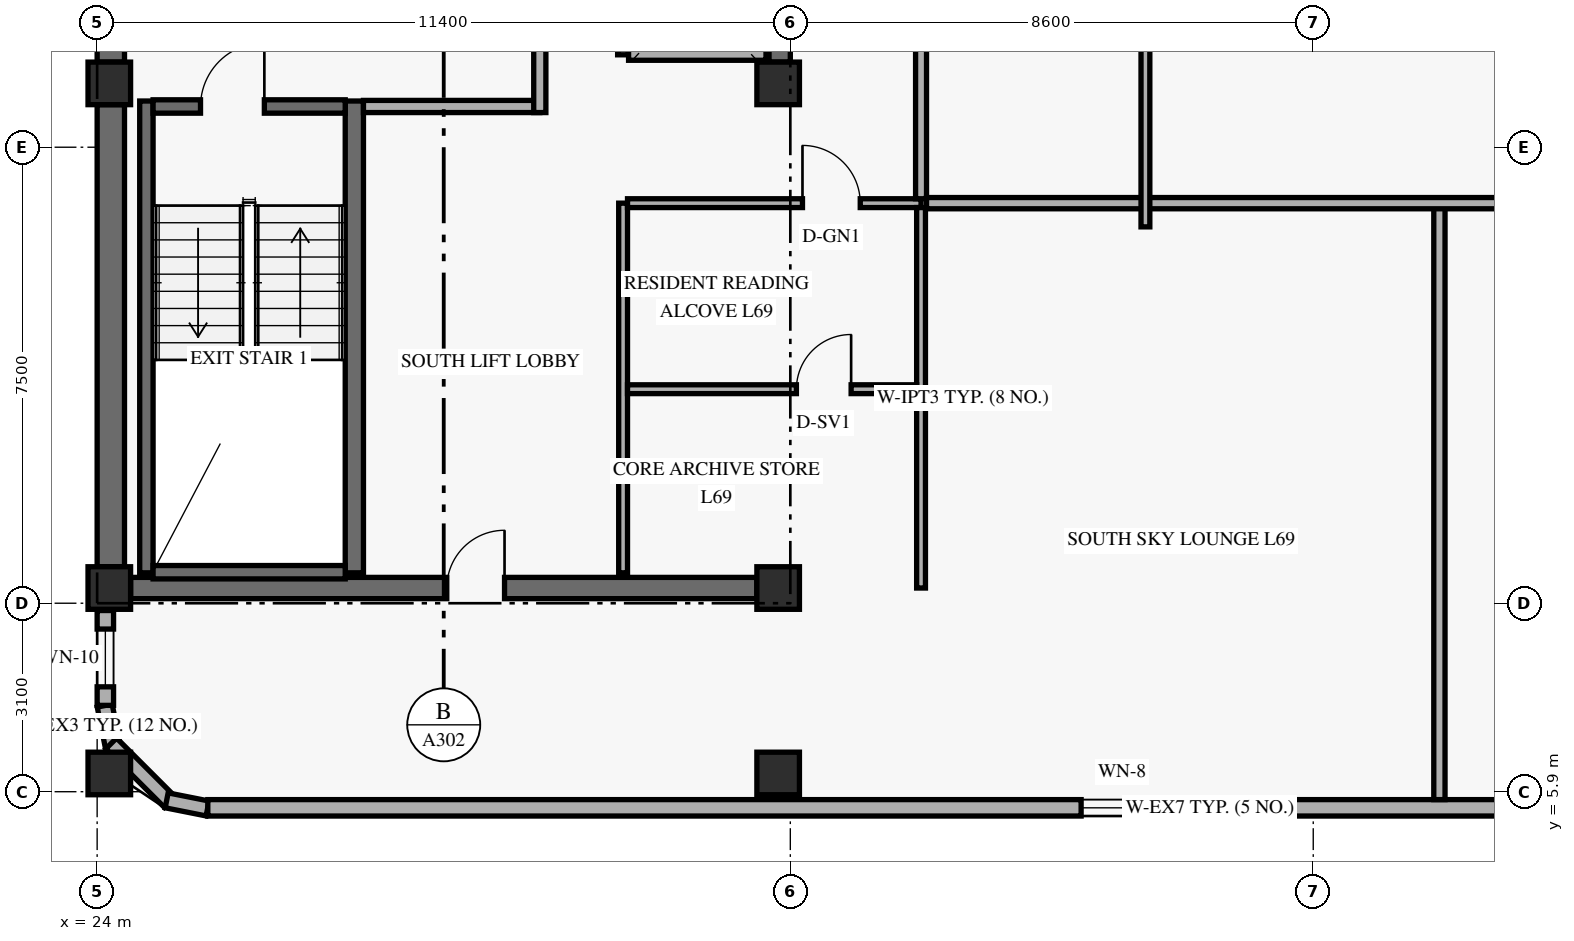
"""IFC4 building model, lengths in metres.
Left out: names, types, materials, properties, quantities, classifications, styles, units other than length and angle.
Written with IfcOpenShell. Run it as: python <this file> out.ifc"""

import sys

from ifc_helpers import new_model, si_unit, direction, frame, frame_2d, origin, origin_2d, place, context, subcontext, project, spatial, rectangle, extrude, element, fill, save


model = new_model("IFC4")
c1 = context("Model", 3, precision=1e-05, world=origin(), true_north=direction((0.0, 1.0)))
c2 = subcontext(c1, "Body", "Model", "MODEL_VIEW")
j1 = project(units=[si_unit("LENGTHUNIT", "METRE"), si_unit("PLANEANGLEUNIT", "RADIAN")], contexts=[c1])
p1 = place(None, origin())
s1 = spatial("IfcSite", under=j1, at=p1, CompositionType="ELEMENT")
p2 = place(p1, origin())
s2 = spatial("IfcBuilding", under=s1, at=p2, CompositionType="ELEMENT")
p3 = place(p2, frame((0.0, 0.0, 264.0)))
s3 = spatial("IfcBuildingStorey", under=s2, at=p3, CompositionType="ELEMENT", Elevation=264.0)
p4 = place(p3, frame((24.225, 9.6, 0.0), z_axis=(0.0, 0.0, 1.0), x_axis=(0.0, 1.0, 0.0)))
e1 = element("IfcWall", 1, at=p4, inside=s3, PredefinedType="SHEAR", context=c2, shape_type="SweptSolid", body=[
    extrude(rectangle(XDim=7.6, YDim=0.45, at=frame_2d((3.8, 0.0))), origin(), (0.0, 0.0, 1.0), 2.821),
])
p5 = place(p3, frame((24.225, 17.9, 0.0), z_axis=(0.0, 0.0, 1.0), x_axis=(0.0, 1.0, 0.0)))
e2 = element("IfcWall", 2, at=p5, inside=s3, PredefinedType="SHEAR", context=c2, shape_type="SweptSolid", body=[
    extrude(rectangle(XDim=11.95, YDim=0.45, at=frame_2d((5.975, 0.0))), origin(), (0.0, 0.0, 1.0), 2.821),
])
p6 = place(p3, frame((35.225, 17.9, 0.0), z_axis=(0.0, 0.0, 1.0), x_axis=(0.0, 1.0, 0.0)))
e3 = element("IfcWall", 3, at=p6, inside=s3, PredefinedType="SHEAR", context=c2, shape_type="SweptSolid", body=[
    extrude(rectangle(XDim=10.2, YDim=0.35, at=frame_2d((5.1, 0.0))), origin(), (0.0, 0.0, 1.0), 2.821),
])
p7 = place(p3, frame((24.55, 9.25, 0.0), z_axis=(0.0, 0.0, 1.0), x_axis=(1.0, 0.0, 0.0)))
e4 = element("IfcWall", 4, at=p7, inside=s3, PredefinedType="SHEAR", context=c2, shape_type="SweptSolid", body=[
    extrude(rectangle(XDim=10.3, YDim=0.35, at=frame_2d((5.15, 0.0))), origin(), (0.0, 0.0, 1.0), 3.36),
])
p8 = place(p7, frame((5.2, 0.0, 0.0)))
e5 = element("IfcOpeningElement", 5, at=p8, cuts=e4, PredefinedType="OPENING", context=c2, shape_type="SweptSolid", body=[
    extrude(rectangle(XDim=0.95, YDim=2.15, at=frame_2d((0.475, 1.075))), frame((0.0, 0.185, 0.0), z_axis=(0.0, -1.0, 0.0), x_axis=(1.0, 0.0, 0.0)), (0.0, 0.0, 1.0), 0.37),
])
p9 = place(p3, frame((24.81, 9.5, 0.0), z_axis=(0.0, 0.0, 1.0), x_axis=(0.0, 1.0, 0.0)))
e6 = element("IfcWall", 6, at=p9, inside=s3, PredefinedType="SHEAR", context=c2, shape_type="SweptSolid", body=[
    extrude(rectangle(XDim=7.76, YDim=0.22, at=frame_2d((3.88, 0.0))), origin(), (0.0, 0.0, 1.0), 3.36),
])
p10 = place(p3, frame((28.23, 9.5, 0.0), z_axis=(0.0, 0.0, 1.0), x_axis=(0.0, 1.0, 0.0)))
e7 = element("IfcWall", 7, at=p10, inside=s3, PredefinedType="SHEAR", context=c2, shape_type="SweptSolid", body=[
    extrude(rectangle(XDim=7.76, YDim=0.3, at=frame_2d((3.88, 0.0))), origin(), (0.0, 0.0, 1.0), 3.36),
])
p11 = place(p3, frame((24.92, 9.51, 0.0), z_axis=(0.0, 0.0, 1.0), x_axis=(1.0, 0.0, 0.0)))
e8 = element("IfcWall", 8, at=p11, inside=s3, PredefinedType="SHEAR", context=c2, shape_type="SweptSolid", body=[
    extrude(rectangle(XDim=3.16, YDim=0.22, at=frame_2d((1.58, 0.0))), origin(), (0.0, 0.0, 1.0), 3.36),
])
p12 = place(p3, frame((24.92, 17.17, 0.0), z_axis=(0.0, 0.0, 1.0), x_axis=(1.0, 0.0, 0.0)))
e9 = element("IfcWall", 9, at=p12, inside=s3, PredefinedType="SHEAR", context=c2, shape_type="SweptSolid", body=[
    extrude(rectangle(XDim=3.16, YDim=0.22, at=frame_2d((1.58, 0.0))), origin(), (0.0, 0.0, 1.0), 3.36),
])
p13 = place(p12, frame((0.78, 0.0, 0.0)))
e10 = element("IfcOpeningElement", 10, at=p13, cuts=e9, PredefinedType="OPENING", context=c2, shape_type="SweptSolid", body=[
    extrude(rectangle(XDim=1.05, YDim=2.15, at=frame_2d((0.525, 1.075))), frame((0.0, 0.12, 0.0), z_axis=(0.0, -1.0, 0.0), x_axis=(1.0, 0.0, 0.0)), (0.0, 0.0, 1.0), 0.24),
])
for number, where, z_axis, x_axis in (
    (11, (24.2, 6.2, 0.0), (0.0, 0.0, 1.0), (1.0, 0.0, 0.0)),
    (12, (24.2, 9.25, 0.0), (0.0, 0.0, 1.0), (1.0, 0.0, 0.0)),
    (13, (24.2, 17.55, 0.0), (0.0, 0.0, 1.0), (1.0, 0.0, 0.0)),
    (14, (35.2, 6.2, 0.0), (0.0, 0.0, 1.0), (1.0, 0.0, 0.0)),
    (15, (35.2, 9.25, 0.0), (0.0, 0.0, 1.0), (1.0, 0.0, 0.0)),
    (16, (35.2, 17.55, 0.0), (0.0, 0.0, 1.0), (1.0, 0.0, 0.0)),
):
    element("IfcColumn", number, at=place(p3, frame(where, z_axis=z_axis, x_axis=x_axis)), inside=s3, PredefinedType="COLUMN", context=c2, shape_type="SweptSolid", body=[
        extrude(rectangle(XDim=0.7, YDim=0.7, at=origin_2d()), origin(), (0.0, 0.0, 1.0), 3.6),
    ])
p14 = place(p3, frame((24.124, 7.316, 0.0), z_axis=(0.0, 0.0, 1.0), x_axis=(0.194952956674, -0.980812594069, 0.0)))
e17 = element("IfcWall", 17, at=p14, inside=s3, PredefinedType="SOLIDWALL", context=c2, shape_type="SweptSolid", body=[
    extrude(rectangle(XDim=0.686, YDim=0.25, at=frame_2d((0.343, 0.0))), origin(), (0.0, 0.0, 1.0), 2.803),
])
p15 = place(p3, frame((24.231, 6.694, 0.0), z_axis=(0.0, 0.0, 1.0), x_axis=(0.707106781187, -0.707106781187, 0.0)))
e18 = element("IfcWall", 18, at=p15, inside=s3, PredefinedType="SOLIDWALL", context=c2, shape_type="SweptSolid", body=[
    extrude(rectangle(XDim=1.362, YDim=0.25, at=frame_2d((0.681, 0.0))), origin(), (0.0, 0.0, 1.0), 2.803),
])
p16 = place(p3, frame((25.143, 5.758, 0.0), z_axis=(0.0, 0.0, 1.0), x_axis=(0.980812594069, -0.194952956674, 0.0)))
e19 = element("IfcWall", 19, at=p16, inside=s3, PredefinedType="SOLIDWALL", context=c2, shape_type="SweptSolid", body=[
    extrude(rectangle(XDim=0.686, YDim=0.25, at=frame_2d((0.343, 0.0))), origin(), (0.0, 0.0, 1.0), 3.36),
])
p17 = place(p3, frame((25.82, 5.635, 0.0), z_axis=(0.0, 0.0, 1.0), x_axis=(1.0, 0.0, 0.0)))
e20 = element("IfcWall", 20, at=p17, inside=s3, PredefinedType="SOLIDWALL", context=c2, shape_type="SweptSolid", body=[
    extrude(rectangle(XDim=32.96, YDim=0.27, at=frame_2d((16.48, 0.0))), origin(), (0.0, 0.0, 1.0), 3.36),
])
p18 = place(p17, frame((14.363, 0.0, 0.85)))
e21 = element("IfcOpeningElement", 21, at=p18, cuts=e20, PredefinedType="OPENING", context=c2, shape_type="SweptSolid", body=[
    extrude(rectangle(XDim=1.35, YDim=1.55, at=frame_2d((0.675, 0.775))), frame((0.0, 0.145, 0.0), z_axis=(0.0, -1.0, 0.0), x_axis=(1.0, 0.0, 0.0)), (0.0, 0.0, 1.0), 0.29),
])
p19 = place(p17, frame((25.645, 0.0, 0.85)))
e22 = element("IfcOpeningElement", 22, at=p19, cuts=e20, PredefinedType="OPENING", context=c2, shape_type="SweptSolid", body=[
    extrude(rectangle(XDim=1.35, YDim=1.55, at=frame_2d((0.675, 0.775))), frame((0.0, 0.145, 0.0), z_axis=(0.0, -1.0, 0.0), x_axis=(1.0, 0.0, 0.0)), (0.0, 0.0, 1.0), 0.29),
])
p20 = place(p17, frame((29.03, 0.0, 0.85)))
e23 = element("IfcOpeningElement", 23, at=p20, cuts=e20, PredefinedType="OPENING", context=c2, shape_type="SweptSolid", body=[
    extrude(rectangle(XDim=1.35, YDim=1.55, at=frame_2d((0.675, 0.775))), frame((0.0, 0.145, 0.0), z_axis=(0.0, -1.0, 0.0), x_axis=(1.0, 0.0, 0.0)), (0.0, 0.0, 1.0), 0.29),
])
p21 = place(p3, frame((24.135, 7.32, 0.0), z_axis=(0.0, 0.0, 1.0), x_axis=(0.0, 1.0, 0.0)))
e24 = element("IfcWall", 24, at=p21, inside=s3, PredefinedType="SOLIDWALL", context=c2, shape_type="SweptSolid", body=[
    extrude(rectangle(XDim=1.56, YDim=0.27, at=frame_2d((0.78, 0.0))), origin(), (0.0, 0.0, 1.0), 2.803),
])
p22 = place(p21, frame((0.305, 0.0, 0.85)))
e25 = element("IfcOpeningElement", 25, at=p22, cuts=e24, PredefinedType="OPENING", context=c2, shape_type="SweptSolid", body=[
    extrude(rectangle(XDim=0.95, YDim=1.5, at=frame_2d((0.475, 0.75))), frame((0.0, 0.145, 0.0), z_axis=(0.0, -1.0, 0.0), x_axis=(1.0, 0.0, 0.0)), (0.0, 0.0, 1.0), 0.29),
])
p23 = place(p3, frame((28.38, 17.17, 0.0), z_axis=(0.0, 0.0, 1.0), x_axis=(1.0, 0.0, 0.0)))
e26 = element("IfcWall", 26, at=p23, inside=s3, PredefinedType="STANDARD", context=c2, shape_type="SweptSolid", body=[
    extrude(rectangle(XDim=2.9, YDim=0.2, at=frame_2d((1.45, 0.0))), origin(), (0.0, 0.0, 1.0), 3.36),
])
p24 = place(p3, frame((31.28, 17.07, 0.0), z_axis=(0.0, 0.0, 1.0), x_axis=(0.0, 1.0, 0.0)))
e27 = element("IfcWall", 27, at=p24, inside=s3, PredefinedType="STANDARD", context=c2, shape_type="SweptSolid", body=[
    extrude(rectangle(XDim=3.92, YDim=0.2, at=frame_2d((1.96, 0.0))), origin(), (0.0, 0.0, 1.0), 2.803),
])
p25 = place(p24, frame((1.35, 0.0, 0.0)))
e28 = element("IfcOpeningElement", 28, at=p25, cuts=e27, PredefinedType="OPENING", context=c2, shape_type="SweptSolid", body=[
    extrude(rectangle(XDim=1.2, YDim=2.15, at=frame_2d((0.6, 1.075))), frame((0.0, 0.11, 0.0), z_axis=(0.0, -1.0, 0.0), x_axis=(1.0, 0.0, 0.0)), (0.0, 0.0, 1.0), 0.22),
])
p26 = place(p3, frame((32.65, 18.02, 0.0), z_axis=(0.0, 0.0, 1.0), x_axis=(0.0, 1.0, 0.0)))
e29 = element("IfcWall", 29, at=p26, inside=s3, PredefinedType="STANDARD", context=c2, shape_type="SweptSolid", body=[
    extrude(rectangle(XDim=10.06, YDim=0.18, at=frame_2d((5.03, 0.0))), origin(), (0.0, 0.0, 1.0), 3.36),
])
p27 = place(p26, frame((0.48, 0.0, 0.0)))
e30 = element("IfcOpeningElement", 30, at=p27, cuts=e29, PredefinedType="OPENING", context=c2, shape_type="SweptSolid", body=[
    extrude(rectangle(XDim=1.05, YDim=2.2, at=frame_2d((0.525, 1.1))), frame((0.0, 0.1, 0.0), z_axis=(0.0, -1.0, 0.0), x_axis=(1.0, 0.0, 0.0)), (0.0, 0.0, 1.0), 0.2),
])
p28 = place(p26, frame((2.48, 0.0, 0.0)))
e31 = element("IfcOpeningElement", 31, at=p28, cuts=e29, PredefinedType="OPENING", context=c2, shape_type="SweptSolid", body=[
    extrude(rectangle(XDim=1.05, YDim=2.2, at=frame_2d((0.525, 1.1))), frame((0.0, 0.1, 0.0), z_axis=(0.0, -1.0, 0.0), x_axis=(1.0, 0.0, 0.0)), (0.0, 0.0, 1.0), 0.2),
])
p29 = place(p26, frame((4.48, 0.0, 0.0)))
e32 = element("IfcOpeningElement", 32, at=p29, cuts=e29, PredefinedType="OPENING", context=c2, shape_type="SweptSolid", body=[
    extrude(rectangle(XDim=1.05, YDim=2.2, at=frame_2d((0.525, 1.1))), frame((0.0, 0.1, 0.0), z_axis=(0.0, -1.0, 0.0), x_axis=(1.0, 0.0, 0.0)), (0.0, 0.0, 1.0), 0.2),
])
p30 = place(p3, frame((32.74, 18.02, 0.0), z_axis=(0.0, 0.0, 1.0), x_axis=(1.0, 0.0, 0.0)))
e33 = element("IfcWall", 33, at=p30, inside=s3, PredefinedType="STANDARD", context=c2, shape_type="SweptSolid", body=[
    extrude(rectangle(XDim=2.26, YDim=0.18, at=frame_2d((1.13, 0.0))), origin(), (0.0, 0.0, 1.0), 3.36),
])
p31 = place(p3, frame((32.65, 9.5, 0.0), z_axis=(0.0, 0.0, 1.0), x_axis=(0.0, 1.0, 0.0)))
e34 = element("IfcWall", 34, at=p31, inside=s3, PredefinedType="PARTITIONING", context=c2, shape_type="SweptSolid", body=[
    extrude(rectangle(XDim=6.08, YDim=0.145, at=frame_2d((3.04, 0.0))), origin(), (0.0, 0.0, 1.0), 3.36),
])
p32 = place(p3, frame((32.722, 15.58, 0.0), z_axis=(0.0, 0.0, 1.0), x_axis=(1.0, 0.0, 0.0)))
e35 = element("IfcWall", 35, at=p32, inside=s3, PredefinedType="PARTITIONING", context=c2, shape_type="SweptSolid", body=[
    extrude(rectangle(XDim=4.828, YDim=0.145, at=frame_2d((2.414, 0.0))), origin(), (0.0, 0.0, 1.0), 2.803),
])
p33 = place(p32, frame((2.877, 0.0, 0.0)))
e36 = element("IfcOpeningElement", 36, at=p33, cuts=e35, PredefinedType="OPENING", context=c2, shape_type="SweptSolid", body=[
    extrude(rectangle(XDim=0.95, YDim=2.15, at=frame_2d((0.475, 1.075))), frame((0.0, 0.083, 0.0), z_axis=(0.0, -1.0, 0.0), x_axis=(1.0, 0.0, 0.0)), (0.0, 0.0, 1.0), 0.165),
])
p34 = place(p3, frame((37.55, 9.25, 0.0), z_axis=(0.0, 0.0, 1.0), x_axis=(0.0, 1.0, 0.0)))
e37 = element("IfcWall", 37, at=p34, inside=s3, PredefinedType="PARTITIONING", context=c2, shape_type="SweptSolid", body=[
    extrude(rectangle(XDim=6.258, YDim=0.145, at=frame_2d((3.129, 0.0))), origin(), (0.0, 0.0, 1.0), 2.803),
])
p35 = place(p3, frame((32.722, 12.52, 0.0), z_axis=(0.0, 0.0, 1.0), x_axis=(1.0, 0.0, 0.0)))
e38 = element("IfcWall", 38, at=p35, inside=s3, PredefinedType="PARTITIONING", context=c2, shape_type="SweptSolid", body=[
    extrude(rectangle(XDim=4.755, YDim=0.145, at=frame_2d((2.377, 0.0))), origin(), (0.0, 0.0, 1.0), 2.803),
])
p36 = place(p35, frame((2.778, 0.0, 0.0)))
e39 = element("IfcOpeningElement", 39, at=p36, cuts=e38, PredefinedType="OPENING", context=c2, shape_type="SweptSolid", body=[
    extrude(rectangle(XDim=0.9, YDim=2.1, at=frame_2d((0.45, 1.05))), frame((0.0, 0.083, 0.0), z_axis=(0.0, -1.0, 0.0), x_axis=(1.0, 0.0, 0.0)), (0.0, 0.0, 1.0), 0.165),
])
p37 = place(p3, frame((37.55, 15.653, 0.0), z_axis=(0.0, 0.0, 1.0), x_axis=(0.0, 1.0, 0.0)))
e40 = element("IfcWall", 40, at=p37, inside=s3, PredefinedType="STANDARD", context=c2, shape_type="SweptSolid", body=[
    extrude(rectangle(XDim=9.347, YDim=0.18, at=frame_2d((4.674, 0.0))), origin(), (0.0, 0.0, 1.0), 2.803),
])
p38 = place(p3, frame((46.075, 5.77, 0.0), z_axis=(0.0, 0.0, 1.0), x_axis=(0.0, 1.0, 0.0)))
e41 = element("IfcWall", 41, at=p38, inside=s3, PredefinedType="PARTITIONING", context=c2, shape_type="SweptSolid", body=[
    extrude(rectangle(XDim=9.81, YDim=0.185, at=frame_2d((4.905, 0.0))), origin(), (0.0, 0.0, 1.0), 2.803),
])
p39 = place(p3, frame((37.64, 15.58, 0.0), z_axis=(0.0, 0.0, 1.0), x_axis=(1.0, 0.0, 0.0)))
e42 = element("IfcWall", 42, at=p39, inside=s3, PredefinedType="PARTITIONING", context=c2, shape_type="SweptSolid", body=[
    extrude(rectangle(XDim=16.87, YDim=0.185, at=frame_2d((8.435, 0.0))), origin(), (0.0, 0.0, 1.0), 2.803),
])
p40 = place(p3, frame((41.24, 15.19, 0.0), z_axis=(0.0, 0.0, 1.0), x_axis=(0.0, 1.0, 0.0)))
e43 = element("IfcWall", 43, at=p40, inside=s3, PredefinedType="PARTITIONING", context=c2, shape_type="SweptSolid", body=[
    extrude(rectangle(XDim=9.72, YDim=0.145, at=frame_2d((4.86, 0.0))), origin(), (0.0, 0.0, 1.0), 2.803),
])
p41 = place(p40, frame((4.17, 0.0, 0.0)))
e44 = element("IfcOpeningElement", 44, at=p41, cuts=e43, PredefinedType="OPENING", context=c2, shape_type="SweptSolid", body=[
    extrude(rectangle(XDim=0.95, YDim=2.15, at=frame_2d((0.475, 1.075))), frame((0.0, 0.083, 0.0), z_axis=(0.0, -1.0, 0.0), x_axis=(1.0, 0.0, 0.0)), (0.0, 0.0, 1.0), 0.165),
])
p42 = place(p18, origin())
e45 = element("IfcWindow", 45, at=p42, inside=s3, PartitioningType="SINGLE_PANEL", PredefinedType="WINDOW", context=c2, shape_type="SweptSolid", body=[
    extrude(rectangle(XDim=1.35, YDim=1.55, at=frame_2d((0.675, 0.775))), frame((0.0, 0.03, 0.0), z_axis=(0.0, -1.0, 0.0), x_axis=(1.0, 0.0, 0.0)), (0.0, 0.0, 1.0), 0.06),
])
fill(e21, e45)
p43 = place(p22, origin())
e46 = element("IfcWindow", 46, at=p43, inside=s3, PartitioningType="SINGLE_PANEL", PredefinedType="WINDOW", context=c2, shape_type="SweptSolid", body=[
    extrude(rectangle(XDim=0.95, YDim=1.5, at=frame_2d((0.475, 0.75))), frame((0.0, 0.03, 0.0), z_axis=(0.0, -1.0, 0.0), x_axis=(1.0, 0.0, 0.0)), (0.0, 0.0, 1.0), 0.06),
])
fill(e25, e46)
p44 = place(p13, frame((1.05, 0.0, 0.0), z_axis=(0.0, 0.0, 1.0), x_axis=(-1.0, 0.0, 0.0)))
e47 = element("IfcDoor", 47, at=p44, inside=s3, OperationType="SINGLE_SWING_LEFT", PredefinedType="DOOR", context=c2, shape_type="SweptSolid", body=[
    extrude(rectangle(XDim=1.05, YDim=2.15, at=frame_2d((0.525, 1.075))), frame((0.0, 0.025, 0.0), z_axis=(0.0, -1.0, 0.0), x_axis=(1.0, 0.0, 0.0)), (0.0, 0.0, 1.0), 0.05),
])
fill(e10, e47)
p45 = place(p33, origin())
e48 = element("IfcDoor", 48, at=p45, inside=s3, OperationType="SINGLE_SWING_LEFT", PredefinedType="DOOR", context=c2, shape_type="SweptSolid", body=[
    extrude(rectangle(XDim=0.95, YDim=2.15, at=frame_2d((0.475, 1.075))), frame((0.0, 0.025, 0.0), z_axis=(0.0, -1.0, 0.0), x_axis=(1.0, 0.0, 0.0)), (0.0, 0.0, 1.0), 0.05),
])
fill(e36, e48)
p46 = place(p36, origin())
e49 = element("IfcDoor", 49, at=p46, inside=s3, OperationType="SINGLE_SWING_RIGHT", PredefinedType="DOOR", context=c2, shape_type="SweptSolid", body=[
    extrude(rectangle(XDim=0.9, YDim=2.1, at=frame_2d((0.45, 1.05))), frame((0.0, 0.025, 0.0), z_axis=(0.0, -1.0, 0.0), x_axis=(1.0, 0.0, 0.0)), (0.0, 0.0, 1.0), 0.05),
])
fill(e39, e49)
p47 = place(p8, frame((0.95, 0.0, 0.0), z_axis=(0.0, 0.0, 1.0), x_axis=(-1.0, 0.0, 0.0)))
e50 = element("IfcDoor", 50, at=p47, inside=s3, OperationType="SINGLE_SWING_LEFT", PredefinedType="DOOR", context=c2, shape_type="SweptSolid", body=[
    extrude(rectangle(XDim=0.95, YDim=2.15, at=frame_2d((0.475, 1.075))), frame((0.0, 0.025, 0.0), z_axis=(0.0, -1.0, 0.0), x_axis=(1.0, 0.0, 0.0)), (0.0, 0.0, 1.0), 0.05),
])
fill(e5, e50)
save(model, sys.argv[1])
